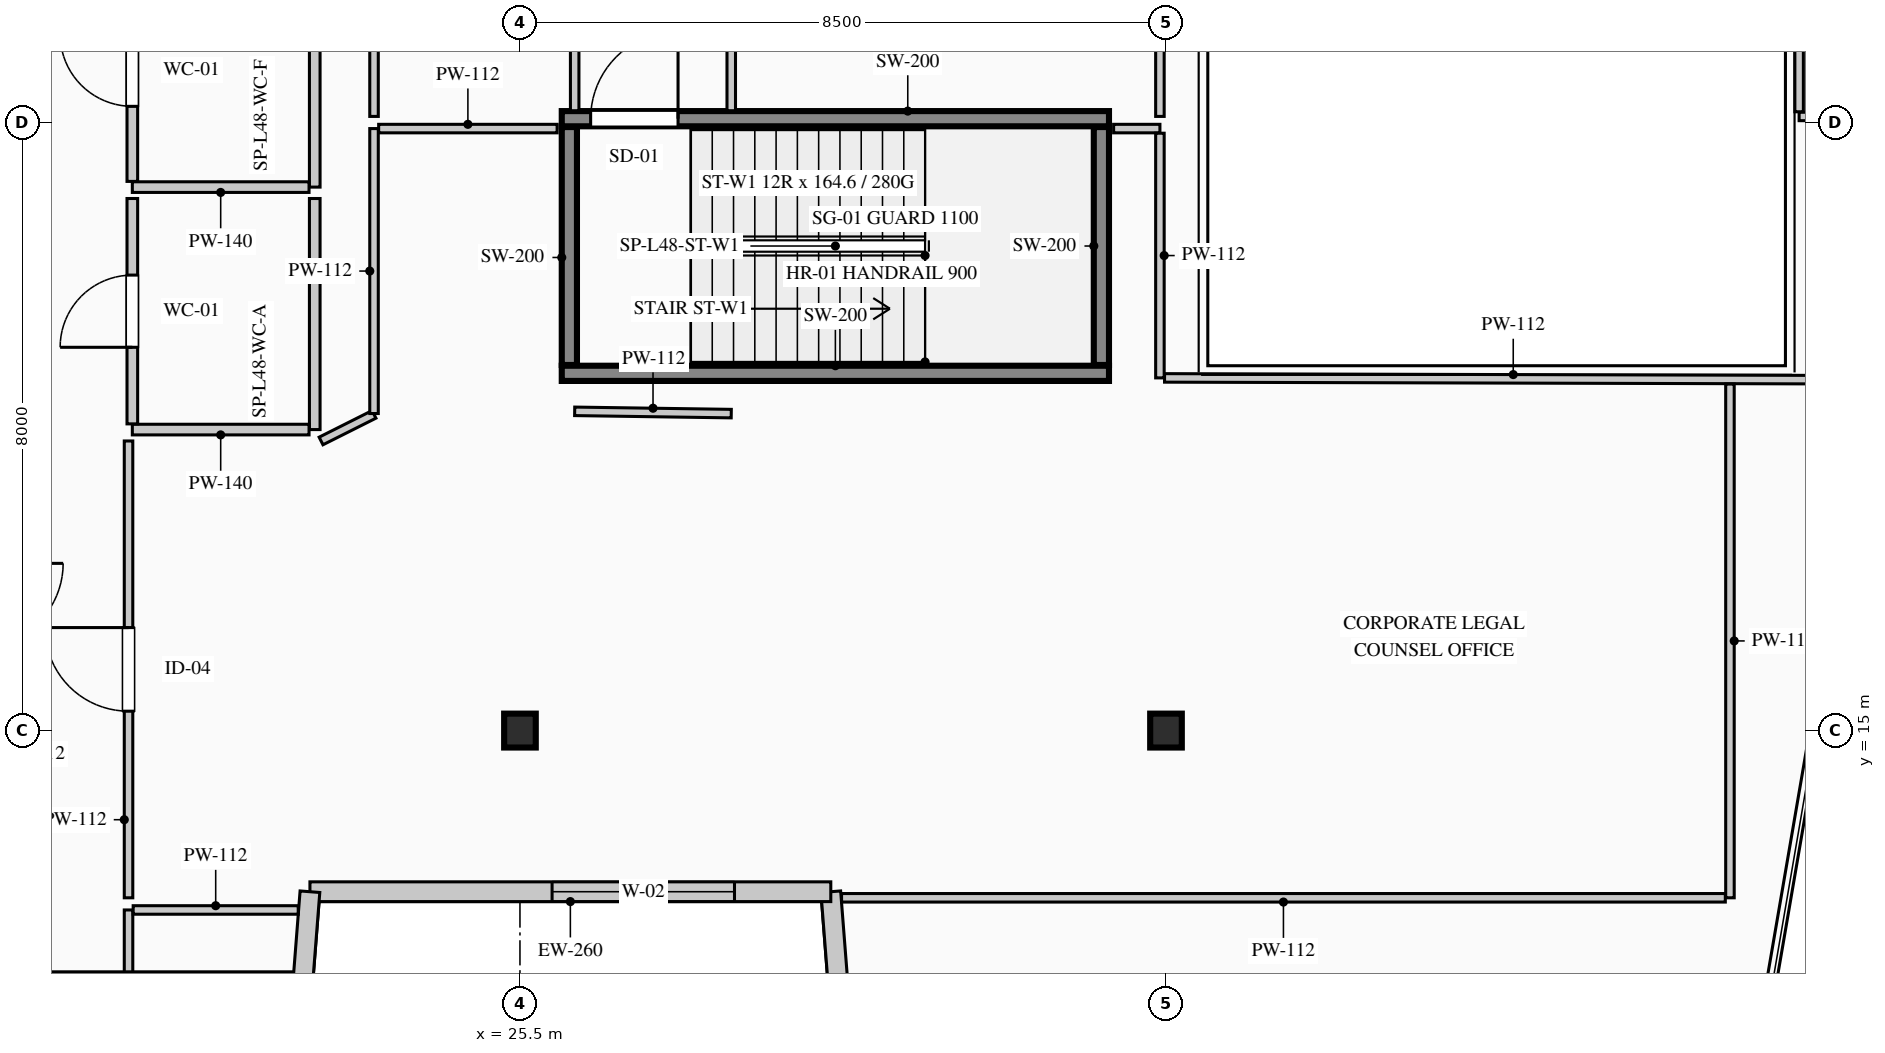
"""IFC4 building model, lengths in metres.
Left out: names, types, materials, properties, quantities, classifications, styles, units other than length and angle.
Written with IfcOpenShell. Run it as: python <this file> out.ifc"""

import sys

from ifc_helpers import new_model, si_unit, direction, frame, frame_2d, origin, origin_2d, place, context, subcontext, project, spatial, rectangle, i_section, extrude, element, fill, save


model = new_model("IFC4")
c1 = context("Model", 3, precision=1e-05, world=origin(), true_north=direction((0.0, 1.0)))
c2 = subcontext(c1, "Body", "Model", "MODEL_VIEW")
j1 = project(units=[si_unit("LENGTHUNIT", "METRE"), si_unit("PLANEANGLEUNIT", "RADIAN")], contexts=[c1])
p1 = place(None, origin())
s1 = spatial("IfcSite", under=j1, at=p1, CompositionType="ELEMENT")
p2 = place(p1, origin())
s2 = spatial("IfcBuilding", under=s1, at=p2, CompositionType="ELEMENT")
p3 = place(p2, frame((0.0, 0.0, 203.5)))
s3 = spatial("IfcBuildingStorey", under=s2, at=p3, CompositionType="ELEMENT", Elevation=203.5)
p4 = place(p3, frame((26.05, 19.7, 0.0), z_axis=(0.0, 0.0, 1.0), x_axis=(1.0, 0.0, 0.0)))
e1 = element("IfcWall", 1, at=p4, inside=s3, PredefinedType="SHEAR", context=c2, shape_type="SweptSolid", body=[
    extrude(rectangle(XDim=7.2, YDim=0.2, at=frame_2d((3.6, 0.0))), origin(), (0.0, 0.0, 1.0), 3.95),
])
p5 = place(p3, frame((26.05, 23.05, 0.0), z_axis=(0.0, 0.0, 1.0), x_axis=(1.0, 0.0, 0.0)))
e2 = element("IfcWall", 2, at=p5, inside=s3, PredefinedType="SHEAR", context=c2, shape_type="SweptSolid", body=[
    extrude(rectangle(XDim=7.2, YDim=0.2, at=frame_2d((3.6, 0.0))), origin(), (0.0, 0.0, 1.0), 3.95),
])
p6 = place(p5, frame((0.38, 0.0, 0.0)))
e3 = element("IfcOpeningElement", 3, at=p6, cuts=e2, PredefinedType="OPENING", context=c2, shape_type="SweptSolid", body=[
    extrude(rectangle(XDim=1.15, YDim=2.2, at=frame_2d((0.575, 1.1))), frame((0.0, 0.11, 0.0), z_axis=(0.0, -1.0, 0.0), x_axis=(1.0, 0.0, 0.0)), (0.0, 0.0, 1.0), 0.22),
])
for number, where, z_axis, x_axis in (
    (4, (26.15, 19.81, 0.0), (0.0, 0.0, 1.0), (0.0, 1.0, 0.0)),
    (5, (33.15, 19.81, 0.0), (0.0, 0.0, 1.0), (0.0, 1.0, 0.0)),
):
    element("IfcWall", number, at=place(p3, frame(where, z_axis=z_axis, x_axis=x_axis)), inside=s3, PredefinedType="SHEAR", context=c2, shape_type="SweptSolid", body=[
        extrude(rectangle(XDim=3.13, YDim=0.2, at=frame_2d((1.565, 0.0))), origin(), (0.0, 0.0, 1.0), 3.95),
    ])
for number, where, z_axis, x_axis in (
    (6, (25.5, 15.0, 0.0), (0.0, 0.0, 1.0), (1.0, 0.0, 0.0)),
    (7, (34.0, 15.0, 0.0), (0.0, 0.0, 1.0), (1.0, 0.0, 0.0)),
):
    element("IfcColumn", number, at=place(p3, frame(where, z_axis=z_axis, x_axis=x_axis)), inside=s3, PredefinedType="COLUMN", context=c2, shape_type="SweptSolid", body=[
        extrude(i_section(OverallWidth=0.416, OverallDepth=0.446, WebThickness=0.039, FlangeThickness=0.063, FilletRadius=0.015, at=origin_2d()), origin(), (0.0, 0.0, 1.0), 3.95),
    ])
p7 = place(p3, frame((30.39, 2.63, 0.0), z_axis=(0.0, 0.0, 1.0), x_axis=(-0.077816860153, 0.996967670627, 0.0)))
e8 = element("IfcWall", 8, at=p7, inside=s3, PredefinedType="STANDARD", context=c2, shape_type="SweptSolid", body=[
    extrude(rectangle(XDim=10.281, YDim=0.26, at=frame_2d((5.141, 0.0))), origin(), (0.0, 0.0, 1.0), 3.7),
])
p8 = place(p7, frame((5.38, 0.0, 0.9)))
e9 = element("IfcOpeningElement", 9, at=p8, cuts=e8, PredefinedType="OPENING", context=c2, shape_type="SweptSolid", body=[
    extrude(rectangle(XDim=2.4, YDim=2.1, at=frame_2d((1.2, 1.05))), frame((0.0, 0.14, 0.0), z_axis=(0.0, -1.0, 0.0), x_axis=(1.0, 0.0, 0.0)), (0.0, 0.0, 1.0), 0.28),
])
p9 = place(p3, frame((29.59, 12.88, 0.0), z_axis=(0.0, 0.0, 1.0), x_axis=(-1.0, 0.0, 0.0)))
e10 = element("IfcWall", 10, at=p9, inside=s3, PredefinedType="STANDARD", context=c2, shape_type="SweptSolid", body=[
    extrude(rectangle(XDim=6.853, YDim=0.26, at=frame_2d((3.426, 0.0))), origin(), (0.0, 0.0, 1.0), 3.7),
])
p10 = place(p9, frame((1.267, 0.0, 0.9)))
e11 = element("IfcOpeningElement", 11, at=p10, cuts=e10, PredefinedType="OPENING", context=c2, shape_type="SweptSolid", body=[
    extrude(rectangle(XDim=2.4, YDim=2.1, at=frame_2d((1.2, 1.05))), frame((0.0, 0.14, 0.0), z_axis=(0.0, -1.0, 0.0), x_axis=(1.0, 0.0, 0.0)), (0.0, 0.0, 1.0), 0.28),
])
p11 = place(p3, frame((22.737, 12.88, 0.0), z_axis=(0.0, 0.0, 1.0), x_axis=(-0.077816860153, -0.996967670627, 0.0)))
e12 = element("IfcWall", 12, at=p11, inside=s3, PredefinedType="STANDARD", context=c2, shape_type="SweptSolid", body=[
    extrude(rectangle(XDim=10.281, YDim=0.26, at=frame_2d((5.141, 0.0))), origin(), (0.0, 0.0, 1.0), 3.7),
])
p12 = place(p11, frame((2.501, 0.0, 0.9)))
e13 = element("IfcOpeningElement", 13, at=p12, cuts=e12, PredefinedType="OPENING", context=c2, shape_type="SweptSolid", body=[
    extrude(rectangle(XDim=2.4, YDim=2.1, at=frame_2d((1.2, 1.05))), frame((0.0, 0.14, 0.0), z_axis=(0.0, -1.0, 0.0), x_axis=(1.0, 0.0, 0.0)), (0.0, 0.0, 1.0), 0.28),
])
p13 = place(p3, frame((22.8, 25.15, 0.0), z_axis=(0.0, 0.0, 1.0), x_axis=(0.0, -1.0, 0.0)))
e14 = element("IfcWall", 14, at=p13, inside=s3, PredefinedType="PARTITIONING", context=c2, shape_type="SweptSolid", body=[
    extrude(rectangle(XDim=3.0, YDim=0.14, at=frame_2d((1.5, 0.0))), origin(), (0.0, 0.0, 1.0), 3.285),
])
p14 = place(p3, frame((22.725, 22.15, 0.0), z_axis=(0.0, 0.0, 1.0), x_axis=(-1.0, 0.0, 0.0)))
e15 = element("IfcWall", 15, at=p14, inside=s3, PredefinedType="PARTITIONING", context=c2, shape_type="SweptSolid", body=[
    extrude(rectangle(XDim=2.325, YDim=0.14, at=frame_2d((1.163, 0.0))), origin(), (0.0, 0.0, 1.0), 3.7),
])
p15 = place(p3, frame((20.4, 22.225, 0.0), z_axis=(0.0, 0.0, 1.0), x_axis=(0.0, 1.0, 0.0)))
e16 = element("IfcWall", 16, at=p15, inside=s3, PredefinedType="PARTITIONING", context=c2, shape_type="SweptSolid", body=[
    extrude(rectangle(XDim=2.925, YDim=0.14, at=frame_2d((1.462, 0.0))), origin(), (0.0, 0.0, 1.0), 3.7),
])
p16 = place(p15, frame((0.988, 0.0, 0.0)))
e17 = element("IfcOpeningElement", 17, at=p16, cuts=e16, PredefinedType="OPENING", context=c2, shape_type="SweptSolid", body=[
    extrude(rectangle(XDim=0.95, YDim=2.15, at=frame_2d((0.475, 1.075))), frame((0.0, 0.08, 0.0), z_axis=(0.0, -1.0, 0.0), x_axis=(1.0, 0.0, 0.0)), (0.0, 0.0, 1.0), 0.16),
])
p17 = place(p3, frame((22.8, 22.0, 0.0), z_axis=(0.0, 0.0, 1.0), x_axis=(0.0, -1.0, 0.0)))
e18 = element("IfcWall", 18, at=p17, inside=s3, PredefinedType="PARTITIONING", context=c2, shape_type="SweptSolid", body=[
    extrude(rectangle(XDim=3.04, YDim=0.14, at=frame_2d((1.52, 0.0))), origin(), (0.0, 0.0, 1.0), 3.285),
])
p18 = place(p3, frame((22.725, 18.96, 0.0), z_axis=(0.0, 0.0, 1.0), x_axis=(-1.0, 0.0, 0.0)))
e19 = element("IfcWall", 19, at=p18, inside=s3, PredefinedType="PARTITIONING", context=c2, shape_type="SweptSolid", body=[
    extrude(rectangle(XDim=2.325, YDim=0.14, at=frame_2d((1.163, 0.0))), origin(), (0.0, 0.0, 1.0), 3.7),
])
p19 = place(p3, frame((20.4, 19.035, 0.0), z_axis=(0.0, 0.0, 1.0), x_axis=(0.0, 1.0, 0.0)))
e20 = element("IfcWall", 20, at=p19, inside=s3, PredefinedType="PARTITIONING", context=c2, shape_type="SweptSolid", body=[
    extrude(rectangle(XDim=2.965, YDim=0.14, at=frame_2d((1.482, 0.0))), origin(), (0.0, 0.0, 1.0), 3.7),
])
p20 = place(p19, frame((1.008, 0.0, 0.0)))
e21 = element("IfcOpeningElement", 21, at=p20, cuts=e20, PredefinedType="OPENING", context=c2, shape_type="SweptSolid", body=[
    extrude(rectangle(XDim=0.95, YDim=2.15, at=frame_2d((0.475, 1.075))), frame((0.0, 0.08, 0.0), z_axis=(0.0, -1.0, 0.0), x_axis=(1.0, 0.0, 0.0)), (0.0, 0.0, 1.0), 0.16),
])
p21 = place(p3, frame((20.35, 11.8, 0.0), z_axis=(0.0, 0.0, 1.0), x_axis=(0.0, 1.0, 0.0)))
e22 = element("IfcWall", 22, at=p21, inside=s3, PredefinedType="PARTITIONING", context=c2, shape_type="SweptSolid", body=[
    extrude(rectangle(XDim=0.84, YDim=0.112, at=frame_2d((0.42, 0.0))), origin(), (0.0, 0.0, 1.0), 3.7),
])
p22 = place(p3, frame((20.411, 12.64, 0.0), z_axis=(0.0, 0.0, 1.0), x_axis=(1.0, 0.0, 0.0)))
e23 = element("IfcWall", 23, at=p22, inside=s3, PredefinedType="PARTITIONING", context=c2, shape_type="SweptSolid", body=[
    extrude(rectangle(XDim=2.172, YDim=0.112, at=frame_2d((1.086, 0.0))), origin(), (0.0, 0.0, 1.0), 3.7),
])
p23 = place(p3, frame((13.341, 11.77, 0.0), z_axis=(0.0, 0.0, 1.0), x_axis=(1.0, 0.0, 0.0)))
e24 = element("IfcWall", 24, at=p23, inside=s3, PredefinedType="PARTITIONING", context=c2, shape_type="SweptSolid", body=[
    extrude(rectangle(XDim=9.174, YDim=0.112, at=frame_2d((4.587, 0.0))), origin(), (0.0, 0.0, 1.0), 3.7),
])
p24 = place(p23, frame((4.037, 0.0, 0.0)))
e25 = element("IfcOpeningElement", 25, at=p24, cuts=e24, PredefinedType="OPENING", context=c2, shape_type="SweptSolid", body=[
    extrude(rectangle(XDim=1.1, YDim=2.2, at=frame_2d((0.55, 1.1))), frame((0.0, 0.066, 0.0), z_axis=(0.0, -1.0, 0.0), x_axis=(1.0, 0.0, 0.0)), (0.0, 0.0, 1.0), 0.132),
])
p25 = place(p3, frame((33.311, 22.92, 0.0), z_axis=(0.0, 0.0, 1.0), x_axis=(1.0, 0.0, 0.0)))
e26 = element("IfcWall", 26, at=p25, inside=s3, PredefinedType="PARTITIONING", context=c2, shape_type="SweptSolid", body=[
    extrude(rectangle(XDim=0.609, YDim=0.112, at=frame_2d((0.305, 0.0))), origin(), (0.0, 0.0, 1.0), 3.7),
])
p26 = place(p3, frame((33.92, 22.859, 0.0), z_axis=(0.0, 0.0, 1.0), x_axis=(0.0, -1.0, 0.0)))
e27 = element("IfcWall", 27, at=p26, inside=s3, PredefinedType="PARTITIONING", context=c2, shape_type="SweptSolid", body=[
    extrude(rectangle(XDim=3.219, YDim=0.112, at=frame_2d((1.609, 0.0))), origin(), (0.0, 0.0, 1.0), 2.885),
])
p27 = place(p3, frame((33.981, 19.64, 0.0), z_axis=(0.0, 0.0, 1.0), x_axis=(0.999996388808, -0.002687447056, 0.0)))
e28 = element("IfcWall", 28, at=p27, inside=s3, PredefinedType="PARTITIONING", context=c2, shape_type="SweptSolid", body=[
    extrude(rectangle(XDim=9.175, YDim=0.112, at=frame_2d((4.588, 0.0))), origin(), (0.0, 0.0, 1.0), 3.7),
])
p28 = place(p3, frame((41.42, 19.559, 0.0), z_axis=(0.0, 0.0, 1.0), x_axis=(0.0, -1.0, 0.0)))
e29 = element("IfcWall", 29, at=p28, inside=s3, PredefinedType="PARTITIONING", context=c2, shape_type="SweptSolid", body=[
    extrude(rectangle(XDim=6.759, YDim=0.112, at=frame_2d((3.379, 0.0))), origin(), (0.0, 0.0, 1.0), 3.7),
])
p29 = place(p3, frame((41.359, 12.8, 0.0), z_axis=(0.0, 0.0, 1.0), x_axis=(-1.0, 0.0, 0.0)))
e30 = element("IfcWall", 30, at=p29, inside=s3, PredefinedType="PARTITIONING", context=c2, shape_type="SweptSolid", body=[
    extrude(rectangle(XDim=11.627, YDim=0.112, at=frame_2d((5.814, 0.0))), origin(), (0.0, 0.0, 1.0), 3.7),
])
p30 = place(p3, frame((20.35, 12.8, 0.0), z_axis=(0.0, 0.0, 1.0), x_axis=(0.0, 1.0, 0.0)))
e31 = element("IfcWall", 31, at=p30, inside=s3, PredefinedType="PARTITIONING", context=c2, shape_type="SweptSolid", body=[
    extrude(rectangle(XDim=6.01, YDim=0.112, at=frame_2d((3.005, 0.0))), origin(), (0.0, 0.0, 1.0), 3.7),
])
p31 = place(p30, frame((2.455, 0.0, 0.0)))
e32 = element("IfcOpeningElement", 32, at=p31, cuts=e31, PredefinedType="OPENING", context=c2, shape_type="SweptSolid", body=[
    extrude(rectangle(XDim=1.1, YDim=2.2, at=frame_2d((0.55, 1.1))), frame((0.0, 0.066, 0.0), z_axis=(0.0, -1.0, 0.0), x_axis=(1.0, 0.0, 0.0)), (0.0, 0.0, 1.0), 0.132),
])
p32 = place(p3, frame((22.883, 18.81, 0.0), z_axis=(0.0, 0.0, 1.0), x_axis=(0.893737436086, 0.448590453909, 0.0)))
e33 = element("IfcWall", 33, at=p32, inside=s3, PredefinedType="PARTITIONING", context=c2, shape_type="SweptSolid", body=[
    extrude(rectangle(XDim=0.78, YDim=0.112, at=frame_2d((0.39, 0.0))), origin(), (0.0, 0.0, 1.0), 3.7),
])
p33 = place(p3, frame((23.58, 19.171, 0.0), z_axis=(0.0, 0.0, 1.0), x_axis=(0.0, 1.0, 0.0)))
e34 = element("IfcWall", 34, at=p33, inside=s3, PredefinedType="PARTITIONING", context=c2, shape_type="SweptSolid", body=[
    extrude(rectangle(XDim=3.749, YDim=0.112, at=frame_2d((1.875, 0.0))), origin(), (0.0, 0.0, 1.0), 3.7),
])
p34 = place(p3, frame((23.641, 22.92, 0.0), z_axis=(0.0, 0.0, 1.0), x_axis=(1.0, 0.0, 0.0)))
e35 = element("IfcWall", 35, at=p34, inside=s3, PredefinedType="PARTITIONING", context=c2, shape_type="SweptSolid", body=[
    extrude(rectangle(XDim=2.348, YDim=0.112, at=frame_2d((1.174, 0.0))), origin(), (0.0, 0.0, 1.0), 3.7),
])
p35 = place(p3, frame((26.22, 19.2, 0.0), z_axis=(0.0, 0.0, 1.0), x_axis=(0.999893773718, -0.014575365509, 0.0)))
e36 = element("IfcWall", 36, at=p35, inside=s3, PredefinedType="PARTITIONING", context=c2, shape_type="SweptSolid", body=[
    extrude(rectangle(XDim=2.06, YDim=0.112, at=frame_2d((1.03, 0.0))), origin(), (0.0, 0.0, 1.0), 3.7),
])
p36 = place(p3, frame((23.58, 23.08, 0.0), z_axis=(0.0, 0.0, 1.0), x_axis=(0.0, 1.0, 0.0)))
e37 = element("IfcWall", 37, at=p36, inside=s3, PredefinedType="PARTITIONING", context=c2, shape_type="SweptSolid", body=[
    extrude(rectangle(XDim=5.94, YDim=0.112, at=frame_2d((2.97, 0.0))), origin(), (0.0, 0.0, 1.0), 3.7),
])
p37 = place(p3, frame((26.22, 28.959, 0.0), z_axis=(0.0, 0.0, 1.0), x_axis=(0.0, -1.0, 0.0)))
e38 = element("IfcWall", 38, at=p37, inside=s3, PredefinedType="PARTITIONING", context=c2, shape_type="SweptSolid", body=[
    extrude(rectangle(XDim=5.804, YDim=0.112, at=frame_2d((2.902, 0.0))), origin(), (0.0, 0.0, 1.0), 3.7),
])
p38 = place(p37, frame((2.352, 0.0, 0.0)))
e39 = element("IfcOpeningElement", 39, at=p38, cuts=e38, PredefinedType="OPENING", context=c2, shape_type="SweptSolid", body=[
    extrude(rectangle(XDim=1.1, YDim=2.2, at=frame_2d((0.55, 1.1))), frame((0.0, 0.066, 0.0), z_axis=(0.0, -1.0, 0.0), x_axis=(1.0, 0.0, 0.0)), (0.0, 0.0, 1.0), 0.132),
])
p39 = place(p3, frame((28.28, 23.155, 0.0), z_axis=(0.0, 0.0, 1.0), x_axis=(0.0, 1.0, 0.0)))
e40 = element("IfcWall", 40, at=p39, inside=s3, PredefinedType="PARTITIONING", context=c2, shape_type="SweptSolid", body=[
    extrude(rectangle(XDim=5.865, YDim=0.112, at=frame_2d((2.933, 0.0))), origin(), (0.0, 0.0, 1.0), 3.7),
])
p40 = place(p39, frame((2.383, 0.0, 0.0)))
e41 = element("IfcOpeningElement", 41, at=p40, cuts=e40, PredefinedType="OPENING", context=c2, shape_type="SweptSolid", body=[
    extrude(rectangle(XDim=1.1, YDim=2.2, at=frame_2d((0.55, 1.1))), frame((0.0, 0.066, 0.0), z_axis=(0.0, -1.0, 0.0), x_axis=(1.0, 0.0, 0.0)), (0.0, 0.0, 1.0), 0.132),
])
p41 = place(p3, frame((33.92, 28.959, 0.0), z_axis=(0.0, 0.0, 1.0), x_axis=(0.0, -1.0, 0.0)))
e42 = element("IfcWall", 42, at=p41, inside=s3, PredefinedType="PARTITIONING", context=c2, shape_type="SweptSolid", body=[
    extrude(rectangle(XDim=5.879, YDim=0.112, at=frame_2d((2.939, 0.0))), origin(), (0.0, 0.0, 1.0), 2.885),
])
p42 = place(p3, frame((43.697, 23.08, 0.0), z_axis=(0.0, 0.0, 1.0), x_axis=(-1.0, 0.0, 0.0)))
e43 = element("IfcWall", 43, at=p42, inside=s3, PredefinedType="PARTITIONING", context=c2, shape_type="SweptSolid", body=[
    extrude(rectangle(XDim=1.366, YDim=0.112, at=frame_2d((0.683, 0.0))), origin(), (0.0, 0.0, 1.0), 3.7),
])
p43 = place(p3, frame((42.33, 23.141, 0.0), z_axis=(0.0, 0.0, 1.0), x_axis=(0.0, 1.0, 0.0)))
e44 = element("IfcWall", 44, at=p43, inside=s3, PredefinedType="PARTITIONING", context=c2, shape_type="SweptSolid", body=[
    extrude(rectangle(XDim=5.489, YDim=0.112, at=frame_2d((2.744, 0.0))), origin(), (0.0, 0.0, 1.0), 3.7),
])
p44 = place(p10, origin())
e45 = element("IfcWindow", 45, at=p44, inside=s3, PartitioningType="DOUBLE_PANEL_VERTICAL", PredefinedType="WINDOW", context=c2, shape_type="SweptSolid", body=[
    extrude(rectangle(XDim=2.4, YDim=2.1, at=frame_2d((1.2, 1.05))), frame((0.0, 0.03, 0.0), z_axis=(0.0, -1.0, 0.0), x_axis=(1.0, 0.0, 0.0)), (0.0, 0.0, 1.0), 0.06),
])
fill(e11, e45)
p45 = place(p6, origin())
e46 = element("IfcDoor", 46, at=p45, inside=s3, OperationType="SINGLE_SWING_RIGHT", PredefinedType="DOOR", context=c2, shape_type="SweptSolid", body=[
    extrude(rectangle(XDim=1.15, YDim=2.2, at=frame_2d((0.575, 1.1))), frame((0.0, 0.025, 0.0), z_axis=(0.0, -1.0, 0.0), x_axis=(1.0, 0.0, 0.0)), (0.0, 0.0, 1.0), 0.05),
])
fill(e3, e46)
p46 = place(p16, origin())
e47 = element("IfcDoor", 47, at=p46, inside=s3, OperationType="SINGLE_SWING_RIGHT", PredefinedType="DOOR", context=c2, shape_type="SweptSolid", body=[
    extrude(rectangle(XDim=0.95, YDim=2.15, at=frame_2d((0.475, 1.075))), frame((0.0, 0.025, 0.0), z_axis=(0.0, -1.0, 0.0), x_axis=(1.0, 0.0, 0.0)), (0.0, 0.0, 1.0), 0.05),
])
fill(e17, e47)
p47 = place(p20, origin())
e48 = element("IfcDoor", 48, at=p47, inside=s3, OperationType="SINGLE_SWING_LEFT", PredefinedType="DOOR", context=c2, shape_type="SweptSolid", body=[
    extrude(rectangle(XDim=0.95, YDim=2.15, at=frame_2d((0.475, 1.075))), frame((0.0, 0.025, 0.0), z_axis=(0.0, -1.0, 0.0), x_axis=(1.0, 0.0, 0.0)), (0.0, 0.0, 1.0), 0.05),
])
fill(e21, e48)
p48 = place(p31, origin())
e49 = element("IfcDoor", 49, at=p48, inside=s3, OperationType="SINGLE_SWING_RIGHT", PredefinedType="DOOR", context=c2, shape_type="SweptSolid", body=[
    extrude(rectangle(XDim=1.1, YDim=2.2, at=frame_2d((0.55, 1.1))), frame((0.0, 0.025, 0.0), z_axis=(0.0, -1.0, 0.0), x_axis=(1.0, 0.0, 0.0)), (0.0, 0.0, 1.0), 0.05),
])
fill(e32, e49)
save(model, sys.argv[1])
